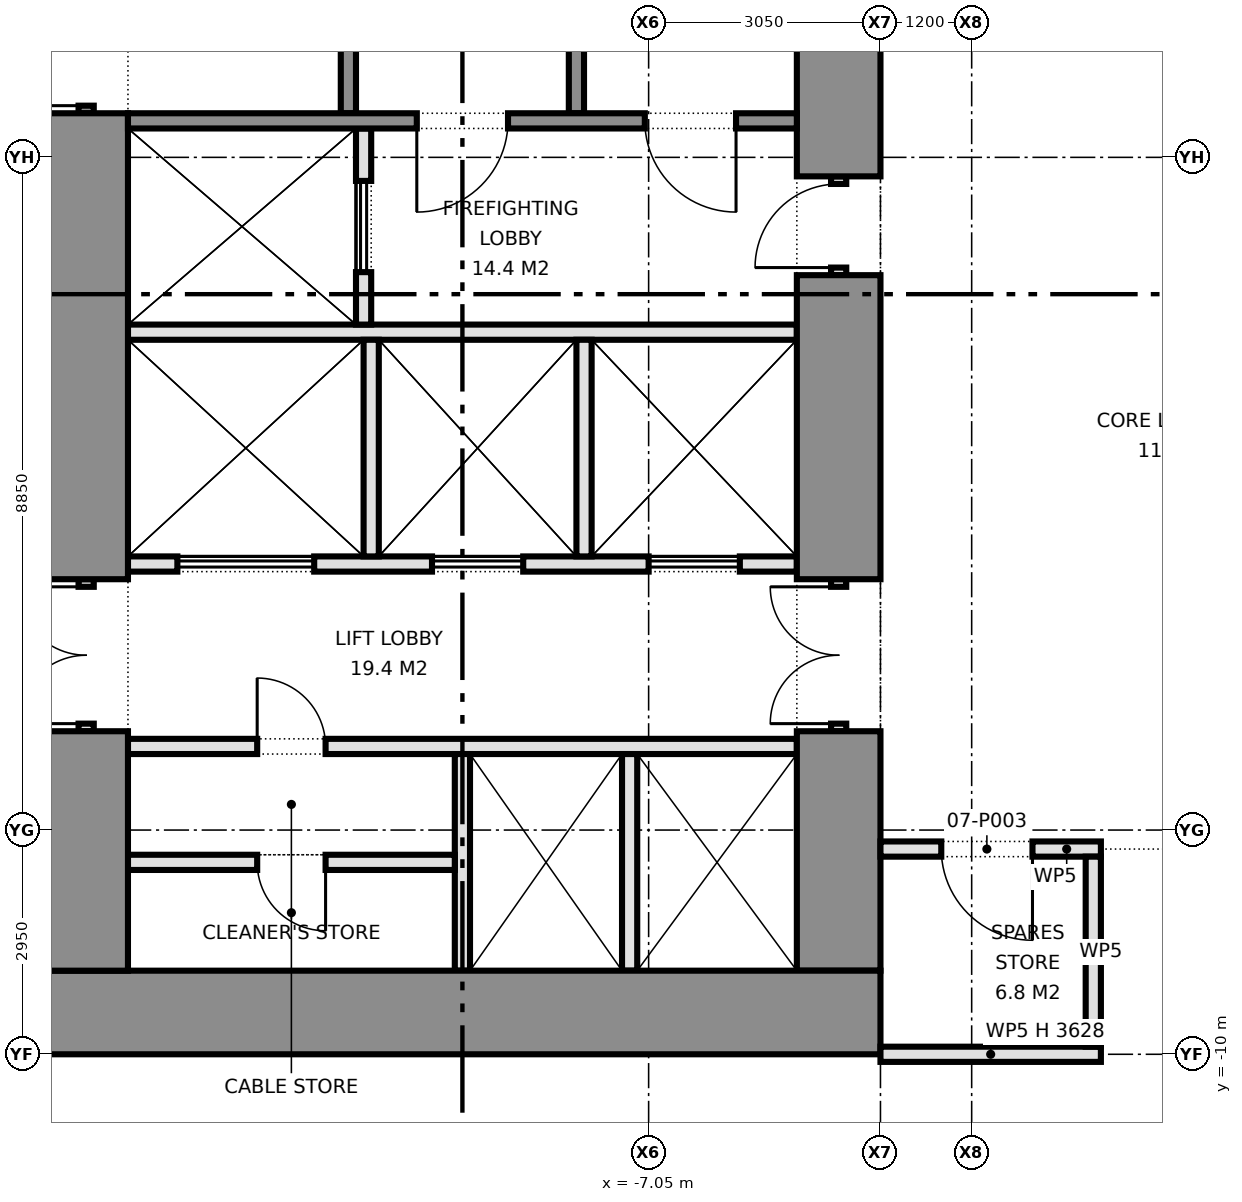
"""IFC4 building model, lengths in metres.
Left out: names, types, materials, properties, quantities, classifications, styles, units other than length and angle.
Written with IfcOpenShell. Run it as: python <this file> out.ifc"""

import sys

from ifc_helpers import new_model, si_unit, direction, frame, frame_2d, origin, place, context, subcontext, project, spatial, rectangle, extrude, element, fill, save


model = new_model("IFC4")
c1 = context("Model", 3, precision=1e-05, world=origin(), true_north=direction((0.0, 1.0)))
c2 = subcontext(c1, "Body", "Model", "MODEL_VIEW")
j1 = project(units=[si_unit("LENGTHUNIT", "METRE"), si_unit("PLANEANGLEUNIT", "RADIAN")], contexts=[c1])
p1 = place(None, origin())
s1 = spatial("IfcSite", under=j1, at=p1, CompositionType="ELEMENT")
p2 = place(p1, origin())
s2 = spatial("IfcBuilding", under=s1, at=p2, CompositionType="ELEMENT")
p3 = place(p2, frame((0.0, 0.0, 30.5)))
s3 = spatial("IfcBuildingStorey", under=s2, at=p3, CompositionType="ELEMENT", Elevation=30.5)
p4 = place(p3, frame((-15.0, -9.45, 0.0), z_axis=(0.0, 0.0, 1.0), x_axis=(1.0, 0.0, 0.0)))
e1 = element("IfcWall", 1, at=p4, inside=s3, PredefinedType="SHEAR", context=c2, shape_type="SweptSolid", body=[
    extrude(rectangle(XDim=11.0, YDim=1.1, at=frame_2d((5.5, 0.0))), origin(), (0.0, 0.0, 1.0), 4.575),
])
p5 = place(p3, frame((-14.45, -8.9, 0.0), z_axis=(0.0, 0.0, 1.0), x_axis=(0.0, 1.0, 0.0)))
e2 = element("IfcWall", 2, at=p5, inside=s3, PredefinedType="SHEAR", context=c2, shape_type="SweptSolid", body=[
    extrude(rectangle(XDim=3.15, YDim=1.1, at=frame_2d((1.575, 0.0))), origin(), (0.0, 0.0, 1.0), 4.575),
])
p6 = place(p3, frame((-14.45, -5.75, 0.0), z_axis=(0.0, 0.0, 1.0), x_axis=(0.0, 1.0, 0.0)))
e3 = element("IfcWall", 3, at=p6, inside=s3, PredefinedType="PARTITIONING", context=c2, shape_type="SweptSolid", body=[
    extrude(rectangle(XDim=2.0, YDim=0.2, at=frame_2d((1.0, 0.0))), origin(), (0.0, 0.0, 1.0), 2.4),
])
p7 = place(p6, frame((0.1, 0.0, 0.0)))
e4 = element("IfcOpeningElement", 4, at=p7, cuts=e3, PredefinedType="OPENING", context=c2, shape_type="SweptSolid", body=[
    extrude(rectangle(XDim=1.8, YDim=2.1, at=frame_2d((0.9, 1.05))), frame((0.0, 0.11, 0.0), z_axis=(0.0, -1.0, 0.0), x_axis=(1.0, 0.0, 0.0)), (0.0, 0.0, 1.0), 0.22),
])
p8 = place(p3, frame((-14.45, -3.75, 0.0), z_axis=(0.0, 0.0, 1.0), x_axis=(0.0, 1.0, 0.0)))
e5 = element("IfcWall", 5, at=p8, inside=s3, PredefinedType="SHEAR", context=c2, shape_type="SweptSolid", body=[
    extrude(rectangle(XDim=6.13, YDim=1.1, at=frame_2d((3.065, 0.0))), origin(), (0.0, 0.0, 1.0), 4.575),
])
p9 = place(p3, frame((-14.45, 2.38, 0.0), z_axis=(0.0, 0.0, 1.0), x_axis=(0.0, 1.0, 0.0)))
e6 = element("IfcWall", 6, at=p9, inside=s3, PredefinedType="SHEAR", context=c2, shape_type="SweptSolid", body=[
    extrude(rectangle(XDim=1.3, YDim=0.2, at=frame_2d((0.65, 0.0))), origin(), (0.0, 0.0, 1.0), 2.4),
])
p10 = place(p9, frame((0.1, 0.0, 0.0)))
e7 = element("IfcOpeningElement", 7, at=p10, cuts=e6, PredefinedType="OPENING", context=c2, shape_type="SweptSolid", body=[
    extrude(rectangle(XDim=1.1, YDim=2.1, at=frame_2d((0.55, 1.05))), frame((0.0, 0.11, 0.0), z_axis=(0.0, -1.0, 0.0), x_axis=(1.0, 0.0, 0.0)), (0.0, 0.0, 1.0), 0.22),
])
p11 = place(p3, frame((-4.55, -8.9, 0.0), z_axis=(0.0, 0.0, 1.0), x_axis=(0.0, 1.0, 0.0)))
e8 = element("IfcWall", 8, at=p11, inside=s3, PredefinedType="SHEAR", context=c2, shape_type="SweptSolid", body=[
    extrude(rectangle(XDim=3.15, YDim=1.1, at=frame_2d((1.575, 0.0))), origin(), (0.0, 0.0, 1.0), 4.575),
])
p12 = place(p3, frame((-4.55, -5.75, 0.0), z_axis=(0.0, 0.0, 1.0), x_axis=(0.0, 1.0, 0.0)))
e9 = element("IfcWall", 9, at=p12, inside=s3, PredefinedType="PARTITIONING", context=c2, shape_type="SweptSolid", body=[
    extrude(rectangle(XDim=2.0, YDim=0.2, at=frame_2d((1.0, 0.0))), origin(), (0.0, 0.0, 1.0), 2.4),
])
p13 = place(p12, frame((0.1, 0.0, 0.0)))
e10 = element("IfcOpeningElement", 10, at=p13, cuts=e9, PredefinedType="OPENING", context=c2, shape_type="SweptSolid", body=[
    extrude(rectangle(XDim=1.8, YDim=2.1, at=frame_2d((0.9, 1.05))), frame((0.0, 0.11, 0.0), z_axis=(0.0, -1.0, 0.0), x_axis=(1.0, 0.0, 0.0)), (0.0, 0.0, 1.0), 0.22),
])
p14 = place(p3, frame((-4.55, -3.75, 0.0), z_axis=(0.0, 0.0, 1.0), x_axis=(0.0, 1.0, 0.0)))
e11 = element("IfcWall", 11, at=p14, inside=s3, PredefinedType="SHEAR", context=c2, shape_type="SweptSolid", body=[
    extrude(rectangle(XDim=4.0, YDim=1.1, at=frame_2d((2.0, 0.0))), origin(), (0.0, 0.0, 1.0), 4.575),
])
p15 = place(p3, frame((-4.55, 0.25, 0.0), z_axis=(0.0, 0.0, 1.0), x_axis=(0.0, 1.0, 0.0)))
e12 = element("IfcWall", 12, at=p15, inside=s3, PredefinedType="PARTITIONING", context=c2, shape_type="SweptSolid", body=[
    extrude(rectangle(XDim=1.3, YDim=0.2, at=frame_2d((0.65, 0.0))), origin(), (0.0, 0.0, 1.0), 2.4),
])
p16 = place(p15, frame((0.1, 0.0, 0.0)))
e13 = element("IfcOpeningElement", 13, at=p16, cuts=e12, PredefinedType="OPENING", context=c2, shape_type="SweptSolid", body=[
    extrude(rectangle(XDim=1.1, YDim=2.1, at=frame_2d((0.55, 1.05))), frame((0.0, 0.11, 0.0), z_axis=(0.0, -1.0, 0.0), x_axis=(1.0, 0.0, 0.0)), (0.0, 0.0, 1.0), 0.22),
])
p17 = place(p3, frame((-4.55, 1.55, 0.0), z_axis=(0.0, 0.0, 1.0), x_axis=(0.0, 1.0, 0.0)))
e14 = element("IfcWall", 14, at=p17, inside=s3, PredefinedType="SHEAR", context=c2, shape_type="SweptSolid", body=[
    extrude(rectangle(XDim=7.35, YDim=1.1, at=frame_2d((3.675, 0.0))), origin(), (0.0, 0.0, 1.0), 4.575),
])
p18 = place(p3, frame((-13.9, -5.95, 0.0), z_axis=(0.0, 0.0, 1.0), x_axis=(1.0, 0.0, 0.0)))
e15 = element("IfcWall", 15, at=p18, inside=s3, PredefinedType="PARTITIONING", context=c2, shape_type="SweptSolid", body=[
    extrude(rectangle(XDim=8.8, YDim=0.2, at=frame_2d((4.4, 0.0))), origin(), (0.0, 0.0, 1.0), 4.575),
])
p19 = place(p18, frame((1.7, 0.0, 0.0)))
e16 = element("IfcOpeningElement", 16, at=p19, cuts=e15, PredefinedType="OPENING", context=c2, shape_type="SweptSolid", body=[
    extrude(rectangle(XDim=0.9, YDim=2.1, at=frame_2d((0.45, 1.05))), frame((0.0, 0.11, 0.0), z_axis=(0.0, -1.0, 0.0), x_axis=(1.0, 0.0, 0.0)), (0.0, 0.0, 1.0), 0.22),
])
p20 = place(p3, frame((-13.9, -3.55, 0.0), z_axis=(0.0, 0.0, 1.0), x_axis=(1.0, 0.0, 0.0)))
e17 = element("IfcWall", 17, at=p20, inside=s3, PredefinedType="PARTITIONING", context=c2, shape_type="SweptSolid", body=[
    extrude(rectangle(XDim=8.8, YDim=0.2, at=frame_2d((4.4, 0.0))), origin(), (0.0, 0.0, 1.0), 4.575),
])
p21 = place(p20, frame((0.65, 0.0, 0.0)))
e18 = element("IfcOpeningElement", 18, at=p21, cuts=e17, PredefinedType="OPENING", context=c2, shape_type="SweptSolid", body=[
    extrude(rectangle(XDim=1.8, YDim=2.1, at=frame_2d((0.9, 1.05))), frame((0.0, 0.11, 0.0), z_axis=(0.0, -1.0, 0.0), x_axis=(1.0, 0.0, 0.0)), (0.0, 0.0, 1.0), 0.22),
])
p22 = place(p20, frame((4.0, 0.0, 0.0)))
e19 = element("IfcOpeningElement", 19, at=p22, cuts=e17, PredefinedType="OPENING", context=c2, shape_type="SweptSolid", body=[
    extrude(rectangle(XDim=1.2, YDim=2.1, at=frame_2d((0.6, 1.05))), frame((0.0, 0.11, 0.0), z_axis=(0.0, -1.0, 0.0), x_axis=(1.0, 0.0, 0.0)), (0.0, 0.0, 1.0), 0.22),
])
p23 = place(p20, frame((6.85, 0.0, 0.0)))
e20 = element("IfcOpeningElement", 20, at=p23, cuts=e17, PredefinedType="OPENING", context=c2, shape_type="SweptSolid", body=[
    extrude(rectangle(XDim=1.2, YDim=2.1, at=frame_2d((0.6, 1.05))), frame((0.0, 0.11, 0.0), z_axis=(0.0, -1.0, 0.0), x_axis=(1.0, 0.0, 0.0)), (0.0, 0.0, 1.0), 0.22),
])
p24 = place(p3, frame((-13.9, -0.5, 0.0), z_axis=(0.0, 0.0, 1.0), x_axis=(1.0, 0.0, 0.0)))
e21 = element("IfcWall", 21, at=p24, inside=s3, PredefinedType="PARTITIONING", context=c2, shape_type="SweptSolid", body=[
    extrude(rectangle(XDim=8.8, YDim=0.2, at=frame_2d((4.4, 0.0))), origin(), (0.0, 0.0, 1.0), 4.575),
])
p25 = place(p3, frame((-10.8, -0.4, 0.0), z_axis=(0.0, 0.0, 1.0), x_axis=(0.0, 1.0, 0.0)))
e22 = element("IfcWall", 22, at=p25, inside=s3, PredefinedType="PARTITIONING", context=c2, shape_type="SweptSolid", body=[
    extrude(rectangle(XDim=2.58, YDim=0.2, at=frame_2d((1.29, 0.0))), origin(), (0.0, 0.0, 1.0), 4.575),
])
p26 = place(p25, frame((0.69, 0.0, 0.0)))
e23 = element("IfcOpeningElement", 23, at=p26, cuts=e22, PredefinedType="OPENING", context=c2, shape_type="SweptSolid", body=[
    extrude(rectangle(XDim=1.2, YDim=2.1, at=frame_2d((0.6, 1.05))), frame((0.0, 0.11, 0.0), z_axis=(0.0, -1.0, 0.0), x_axis=(1.0, 0.0, 0.0)), (0.0, 0.0, 1.0), 0.22),
])
p27 = place(p3, frame((-13.9, 2.28, 0.0), z_axis=(0.0, 0.0, 1.0), x_axis=(1.0, 0.0, 0.0)))
e24 = element("IfcWall", 24, at=p27, inside=s3, PredefinedType="SHEAR", context=c2, shape_type="SweptSolid", body=[
    extrude(rectangle(XDim=8.8, YDim=0.2, at=frame_2d((4.4, 0.0))), origin(), (0.0, 0.0, 1.0), 4.575),
])
p28 = place(p27, frame((3.8, 0.0, 0.0)))
e25 = element("IfcOpeningElement", 25, at=p28, cuts=e24, PredefinedType="OPENING", context=c2, shape_type="SweptSolid", body=[
    extrude(rectangle(XDim=1.2, YDim=2.1, at=frame_2d((0.6, 1.05))), frame((0.0, 0.11, 0.0), z_axis=(0.0, -1.0, 0.0), x_axis=(1.0, 0.0, 0.0)), (0.0, 0.0, 1.0), 0.22),
])
p29 = place(p27, frame((6.8, 0.0, 0.0)))
e26 = element("IfcOpeningElement", 26, at=p29, cuts=e24, PredefinedType="OPENING", context=c2, shape_type="SweptSolid", body=[
    extrude(rectangle(XDim=1.2, YDim=2.1, at=frame_2d((0.6, 1.05))), frame((0.0, 0.11, 0.0), z_axis=(0.0, -1.0, 0.0), x_axis=(1.0, 0.0, 0.0)), (0.0, 0.0, 1.0), 0.22),
])
for number, where, z_axis, x_axis in (
    (27, (-11.0, 2.38, 0.0), (0.0, 0.0, 1.0), (0.0, 1.0, 0.0)),
    (28, (-8.0, 2.38, 0.0), (0.0, 0.0, 1.0), (0.0, 1.0, 0.0)),
):
    element("IfcWall", number, at=place(p3, frame(where, z_axis=z_axis, x_axis=x_axis)), inside=s3, PredefinedType="SHEAR", context=c2, shape_type="SweptSolid", body=[
        extrude(rectangle(XDim=6.52, YDim=0.2, at=frame_2d((3.26, 0.0))), origin(), (0.0, 0.0, 1.0), 4.575),
    ])
for number, where, z_axis, x_axis in (
    (29, (-9.5, -8.9, 0.0), (0.0, 0.0, 1.0), (0.0, 1.0, 0.0)),
    (30, (-7.3, -8.9, 0.0), (0.0, 0.0, 1.0), (0.0, 1.0, 0.0)),
):
    element("IfcWall", number, at=place(p3, frame(where, z_axis=z_axis, x_axis=x_axis)), inside=s3, PredefinedType="PARTITIONING", context=c2, shape_type="SweptSolid", body=[
        extrude(rectangle(XDim=2.85, YDim=0.2, at=frame_2d((1.425, 0.0))), origin(), (0.0, 0.0, 1.0), 4.575),
    ])
p30 = place(p3, frame((-13.9, -7.475, 0.0), z_axis=(0.0, 0.0, 1.0), x_axis=(1.0, 0.0, 0.0)))
e31 = element("IfcWall", 31, at=p30, inside=s3, PredefinedType="PARTITIONING", context=c2, shape_type="SweptSolid", body=[
    extrude(rectangle(XDim=4.3, YDim=0.2, at=frame_2d((2.15, 0.0))), origin(), (0.0, 0.0, 1.0), 4.575),
])
p31 = place(p30, frame((1.7, 0.0, 0.0)))
e32 = element("IfcOpeningElement", 32, at=p31, cuts=e31, PredefinedType="OPENING", context=c2, shape_type="SweptSolid", body=[
    extrude(rectangle(XDim=0.9, YDim=2.1, at=frame_2d((0.45, 1.05))), frame((0.0, 0.11, 0.0), z_axis=(0.0, -1.0, 0.0), x_axis=(1.0, 0.0, 0.0)), (0.0, 0.0, 1.0), 0.22),
])
for number, where, z_axis, x_axis in (
    (33, (-10.7, -3.45, 0.0), (0.0, 0.0, 1.0), (0.0, 1.0, 0.0)),
    (34, (-7.9, -3.45, 0.0), (0.0, 0.0, 1.0), (0.0, 1.0, 0.0)),
):
    element("IfcWall", number, at=place(p3, frame(where, z_axis=z_axis, x_axis=x_axis)), inside=s3, PredefinedType="PARTITIONING", context=c2, shape_type="SweptSolid", body=[
        extrude(rectangle(XDim=2.85, YDim=0.2, at=frame_2d((1.425, 0.0))), origin(), (0.0, 0.0, 1.0), 4.575),
    ])
p32 = place(p3, frame((-4.0, -10.0, 0.0), z_axis=(0.0, 0.0, 1.0), x_axis=(1.0, 0.0, 0.0)))
e35 = element("IfcWall", 35, at=p32, inside=s3, PredefinedType="PARTITIONING", context=c2, shape_type="SweptSolid", body=[
    extrude(rectangle(XDim=2.9, YDim=0.2, at=frame_2d((1.45, 0.0))), origin(), (0.0, 0.0, 1.0), 3.628),
])
p33 = place(p3, frame((-4.0, -7.3, 0.0), z_axis=(0.0, 0.0, 1.0), x_axis=(1.0, 0.0, 0.0)))
e36 = element("IfcWall", 36, at=p33, inside=s3, PredefinedType="PARTITIONING", context=c2, shape_type="SweptSolid", body=[
    extrude(rectangle(XDim=2.9, YDim=0.2, at=frame_2d((1.45, 0.0))), origin(), (0.0, 0.0, 1.0), 4.575),
])
p34 = place(p33, frame((0.8, 0.0, 0.0)))
e37 = element("IfcOpeningElement", 37, at=p34, cuts=e36, PredefinedType="OPENING", context=c2, shape_type="SweptSolid", body=[
    extrude(rectangle(XDim=1.2, YDim=2.1, at=frame_2d((0.6, 1.05))), frame((0.0, 0.11, 0.0), z_axis=(0.0, -1.0, 0.0), x_axis=(1.0, 0.0, 0.0)), (0.0, 0.0, 1.0), 0.22),
])
p35 = place(p3, frame((-1.2, -9.9, 0.0), z_axis=(0.0, 0.0, 1.0), x_axis=(0.0, 1.0, 0.0)))
e38 = element("IfcWall", 38, at=p35, inside=s3, PredefinedType="PARTITIONING", context=c2, shape_type="SweptSolid", body=[
    extrude(rectangle(XDim=2.5, YDim=0.2, at=frame_2d((1.25, 0.0))), origin(), (0.0, 0.0, 1.0), 4.575),
])
p36 = place(p7, origin())
e39 = element("IfcDoor", 39, at=p36, inside=s3, OperationType="DOUBLE_DOOR_SINGLE_SWING", PredefinedType="DOOR", context=c2, shape_type="SweptSolid", body=[
    extrude(rectangle(XDim=1.8, YDim=2.1, at=frame_2d((0.9, 1.05))), frame((0.0, 0.025, 0.0), z_axis=(0.0, -1.0, 0.0), x_axis=(1.0, 0.0, 0.0)), (0.0, 0.0, 1.0), 0.05),
])
fill(e4, e39)
p37 = place(p10, origin())
e40 = element("IfcDoor", 40, at=p37, inside=s3, OperationType="SINGLE_SWING_LEFT", PredefinedType="DOOR", context=c2, shape_type="SweptSolid", body=[
    extrude(rectangle(XDim=1.1, YDim=2.1, at=frame_2d((0.55, 1.05))), frame((0.0, 0.025, 0.0), z_axis=(0.0, -1.0, 0.0), x_axis=(1.0, 0.0, 0.0)), (0.0, 0.0, 1.0), 0.05),
])
fill(e7, e40)
p38 = place(p13, origin())
e41 = element("IfcDoor", 41, at=p38, inside=s3, OperationType="DOUBLE_DOOR_SINGLE_SWING", PredefinedType="DOOR", context=c2, shape_type="SweptSolid", body=[
    extrude(rectangle(XDim=1.8, YDim=2.1, at=frame_2d((0.9, 1.05))), frame((0.0, 0.025, 0.0), z_axis=(0.0, -1.0, 0.0), x_axis=(1.0, 0.0, 0.0)), (0.0, 0.0, 1.0), 0.05),
])
fill(e10, e41)
p39 = place(p16, origin())
e42 = element("IfcDoor", 42, at=p39, inside=s3, OperationType="SINGLE_SWING_LEFT", PredefinedType="DOOR", context=c2, shape_type="SweptSolid", body=[
    extrude(rectangle(XDim=1.1, YDim=2.1, at=frame_2d((0.55, 1.05))), frame((0.0, 0.025, 0.0), z_axis=(0.0, -1.0, 0.0), x_axis=(1.0, 0.0, 0.0)), (0.0, 0.0, 1.0), 0.05),
])
fill(e13, e42)
p40 = place(p21, origin())
e43 = element("IfcDoor", 43, at=p40, inside=s3, OperationType="DOUBLE_DOOR_SLIDING", PredefinedType="DOOR", context=c2, shape_type="SweptSolid", body=[
    extrude(rectangle(XDim=1.8, YDim=2.1, at=frame_2d((0.9, 1.05))), frame((0.0, 0.025, 0.0), z_axis=(0.0, -1.0, 0.0), x_axis=(1.0, 0.0, 0.0)), (0.0, 0.0, 1.0), 0.05),
])
fill(e18, e43)
p41 = place(p22, origin())
e44 = element("IfcDoor", 44, at=p41, inside=s3, OperationType="DOUBLE_DOOR_SLIDING", PredefinedType="DOOR", context=c2, shape_type="SweptSolid", body=[
    extrude(rectangle(XDim=1.2, YDim=2.1, at=frame_2d((0.6, 1.05))), frame((0.0, 0.025, 0.0), z_axis=(0.0, -1.0, 0.0), x_axis=(1.0, 0.0, 0.0)), (0.0, 0.0, 1.0), 0.05),
])
fill(e19, e44)
p42 = place(p23, origin())
e45 = element("IfcDoor", 45, at=p42, inside=s3, OperationType="DOUBLE_DOOR_SLIDING", PredefinedType="DOOR", context=c2, shape_type="SweptSolid", body=[
    extrude(rectangle(XDim=1.2, YDim=2.1, at=frame_2d((0.6, 1.05))), frame((0.0, 0.025, 0.0), z_axis=(0.0, -1.0, 0.0), x_axis=(1.0, 0.0, 0.0)), (0.0, 0.0, 1.0), 0.05),
])
fill(e20, e45)
p43 = place(p26, origin())
e46 = element("IfcDoor", 46, at=p43, inside=s3, OperationType="DOUBLE_DOOR_SLIDING", PredefinedType="DOOR", context=c2, shape_type="SweptSolid", body=[
    extrude(rectangle(XDim=1.2, YDim=2.1, at=frame_2d((0.6, 1.05))), frame((0.0, 0.025, 0.0), z_axis=(0.0, -1.0, 0.0), x_axis=(1.0, 0.0, 0.0)), (0.0, 0.0, 1.0), 0.05),
])
fill(e23, e46)
p44 = place(p19, origin())
e47 = element("IfcDoor", 47, at=p44, inside=s3, OperationType="SINGLE_SWING_LEFT", PredefinedType="DOOR", context=c2, shape_type="SweptSolid", body=[
    extrude(rectangle(XDim=0.9, YDim=2.1, at=frame_2d((0.45, 1.05))), frame((0.0, 0.025, 0.0), z_axis=(0.0, -1.0, 0.0), x_axis=(1.0, 0.0, 0.0)), (0.0, 0.0, 1.0), 0.05),
])
fill(e16, e47)
p45 = place(p31, frame((0.9, 0.0, 0.0), z_axis=(0.0, 0.0, 1.0), x_axis=(-1.0, 0.0, 0.0)))
e48 = element("IfcDoor", 48, at=p45, inside=s3, OperationType="SINGLE_SWING_LEFT", PredefinedType="DOOR", context=c2, shape_type="SweptSolid", body=[
    extrude(rectangle(XDim=0.9, YDim=2.1, at=frame_2d((0.45, 1.05))), frame((0.0, 0.025, 0.0), z_axis=(0.0, -1.0, 0.0), x_axis=(1.0, 0.0, 0.0)), (0.0, 0.0, 1.0), 0.05),
])
fill(e32, e48)
p46 = place(p28, frame((1.2, 0.0, 0.0), z_axis=(0.0, 0.0, 1.0), x_axis=(-1.0, 0.0, 0.0)))
e49 = element("IfcDoor", 49, at=p46, inside=s3, OperationType="SINGLE_SWING_RIGHT", PredefinedType="DOOR", context=c2, shape_type="SweptSolid", body=[
    extrude(rectangle(XDim=1.2, YDim=2.1, at=frame_2d((0.6, 1.05))), frame((0.0, 0.025, 0.0), z_axis=(0.0, -1.0, 0.0), x_axis=(1.0, 0.0, 0.0)), (0.0, 0.0, 1.0), 0.05),
])
fill(e25, e49)
p47 = place(p29, frame((1.2, 0.0, 0.0), z_axis=(0.0, 0.0, 1.0), x_axis=(-1.0, 0.0, 0.0)))
e50 = element("IfcDoor", 50, at=p47, inside=s3, OperationType="SINGLE_SWING_LEFT", PredefinedType="DOOR", context=c2, shape_type="SweptSolid", body=[
    extrude(rectangle(XDim=1.2, YDim=2.1, at=frame_2d((0.6, 1.05))), frame((0.0, 0.025, 0.0), z_axis=(0.0, -1.0, 0.0), x_axis=(1.0, 0.0, 0.0)), (0.0, 0.0, 1.0), 0.05),
])
fill(e26, e50)
p48 = place(p34, frame((1.2, 0.0, 0.0), z_axis=(0.0, 0.0, 1.0), x_axis=(-1.0, 0.0, 0.0)))
e51 = element("IfcDoor", 51, at=p48, inside=s3, OperationType="SINGLE_SWING_LEFT", PredefinedType="DOOR", context=c2, shape_type="SweptSolid", body=[
    extrude(rectangle(XDim=1.2, YDim=2.1, at=frame_2d((0.6, 1.05))), frame((0.0, 0.025, 0.0), z_axis=(0.0, -1.0, 0.0), x_axis=(1.0, 0.0, 0.0)), (0.0, 0.0, 1.0), 0.05),
])
fill(e37, e51)
save(model, sys.argv[1])
